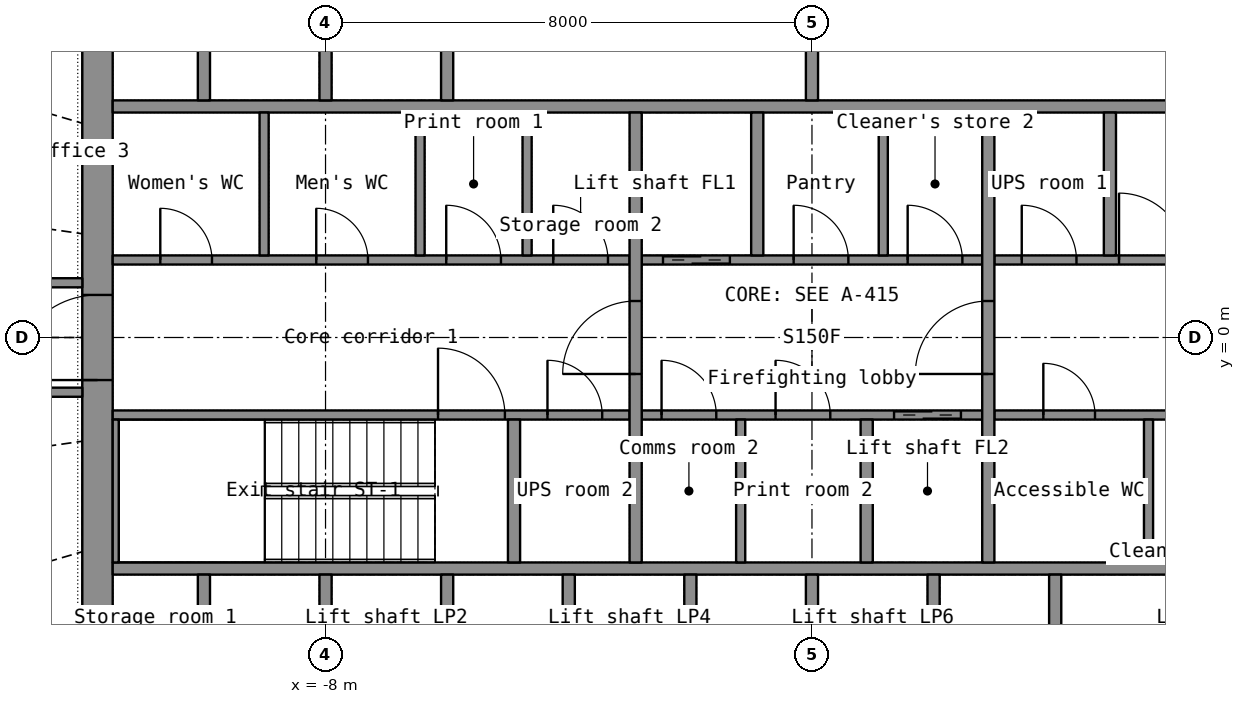
"""IFC4 building model, lengths in metres.
Left out: names, types, materials, properties, quantities, classifications, styles, units other than length and angle.
Written with IfcOpenShell. Run it as: python <this file> out.ifc"""

import sys

from ifc_helpers import new_model, si_unit, direction, frame, frame_2d, origin, place, context, subcontext, project, spatial, rectangle, extrude, element, fill, save


model = new_model("IFC4")
c1 = context("Model", 3, precision=1e-05, world=origin(), true_north=direction((0.0, 1.0)))
c2 = subcontext(c1, "Body", "Model", "MODEL_VIEW")
j1 = project(units=[si_unit("LENGTHUNIT", "METRE"), si_unit("PLANEANGLEUNIT", "RADIAN")], contexts=[c1])
p1 = place(None, origin())
s1 = spatial("IfcSite", under=j1, at=p1, CompositionType="ELEMENT")
p2 = place(p1, origin())
s2 = spatial("IfcBuilding", under=s1, at=p2, CompositionType="ELEMENT")
p3 = place(p2, frame((0.0, 0.0, 100.8)))
s3 = spatial("IfcBuildingStorey", under=s2, at=p3, CompositionType="ELEMENT", Elevation=100.8)
p4 = place(p3, frame((-11.75, -7.2, 0.0), z_axis=(0.0, 0.0, 1.0), x_axis=(0.0, 1.0, 0.0)))
e1 = element("IfcWall", 1, at=p4, inside=s3, PredefinedType="SHEAR", context=c2, shape_type="SweptSolid", body=[
    extrude(rectangle(XDim=14.4, YDim=0.5, at=frame_2d((7.2, 0.0))), origin(), (0.0, 0.0, 1.0), 3.3),
])
p5 = place(p4, frame((6.5, 0.0, 0.0)))
e2 = element("IfcOpeningElement", 2, at=p5, cuts=e1, PredefinedType="OPENING", context=c2, shape_type="SweptSolid", body=[
    extrude(rectangle(XDim=1.4, YDim=2.2, at=frame_2d((0.7, 1.1))), frame((0.0, 0.26, 0.0), z_axis=(0.0, -1.0, 0.0), x_axis=(1.0, 0.0, 0.0)), (0.0, 0.0, 1.0), 0.52),
])
for number, where, z_axis, x_axis in (
    (3, (-11.5, -3.8, 0.0), (0.0, 0.0, 1.0), (1.0, 0.0, 0.0)),
    (4, (-11.5, 3.8, 0.0), (0.0, 0.0, 1.0), (1.0, 0.0, 0.0)),
):
    element("IfcWall", number, at=place(p3, frame(where, z_axis=z_axis, x_axis=x_axis)), inside=s3, PredefinedType="SHEAR", context=c2, shape_type="SweptSolid", body=[
        extrude(rectangle(XDim=23.0, YDim=0.2, at=frame_2d((11.5, 0.0))), origin(), (0.0, 0.0, 1.0), 3.3),
    ])
for number, where, z_axis, x_axis in (
    (5, (-10.0, -6.7, 0.0), (0.0, 0.0, 1.0), (0.0, 1.0, 0.0)),
    (6, (-8.0, -6.7, 0.0), (0.0, 0.0, 1.0), (0.0, 1.0, 0.0)),
    (7, (-6.0, -6.7, 0.0), (0.0, 0.0, 1.0), (0.0, 1.0, 0.0)),
    (8, (-4.0, -6.7, 0.0), (0.0, 0.0, 1.0), (0.0, 1.0, 0.0)),
    (9, (-2.0, -6.7, 0.0), (0.0, 0.0, 1.0), (0.0, 1.0, 0.0)),
    (10, (0.0, -6.7, 0.0), (0.0, 0.0, 1.0), (0.0, 1.0, 0.0)),
    (11, (2.0, -6.7, 0.0), (0.0, 0.0, 1.0), (0.0, 1.0, 0.0)),
    (12, (4.0, -6.7, 0.0), (0.0, 0.0, 1.0), (0.0, 1.0, 0.0)),
    (13, (-10.0, 3.9, 0.0), (0.0, 0.0, 1.0), (0.0, 1.0, 0.0)),
    (14, (-8.0, 3.9, 0.0), (0.0, 0.0, 1.0), (0.0, 1.0, 0.0)),
    (15, (-6.0, 3.9, 0.0), (0.0, 0.0, 1.0), (0.0, 1.0, 0.0)),
):
    element("IfcWall", number, at=place(p3, frame(where, z_axis=z_axis, x_axis=x_axis)), inside=s3, PredefinedType="SHEAR", context=c2, shape_type="SweptSolid", body=[
        extrude(rectangle(XDim=2.8, YDim=0.2, at=frame_2d((1.4, 0.0))), origin(), (0.0, 0.0, 1.0), 3.3),
    ])
p6 = place(p3, frame((0.0, 3.9, 0.0), z_axis=(0.0, 0.0, 1.0), x_axis=(0.0, 1.0, 0.0)))
e16 = element("IfcWall", 16, at=p6, inside=s3, PredefinedType="PARTITIONING", context=c2, shape_type="SweptSolid", body=[
    extrude(rectangle(XDim=2.8, YDim=0.2, at=frame_2d((1.4, 0.0))), origin(), (0.0, 0.0, 1.0), 3.3),
])
p7 = place(p3, frame((-11.5, -1.275, 0.0), z_axis=(0.0, 0.0, 1.0), x_axis=(1.0, 0.0, 0.0)))
e17 = element("IfcWall", 17, at=p7, inside=s3, PredefinedType="SHEAR", context=c2, shape_type="SweptSolid", body=[
    extrude(rectangle(XDim=8.5, YDim=0.15, at=frame_2d((4.25, 0.0))), origin(), (0.0, 0.0, 1.0), 3.3),
])
p8 = place(p7, frame((5.35, 0.0, 0.0)))
e18 = element("IfcOpeningElement", 18, at=p8, cuts=e17, PredefinedType="OPENING", context=c2, shape_type="SweptSolid", body=[
    extrude(rectangle(XDim=1.1, YDim=2.15, at=frame_2d((0.55, 1.075))), frame((0.0, 0.085, 0.0), z_axis=(0.0, -1.0, 0.0), x_axis=(1.0, 0.0, 0.0)), (0.0, 0.0, 1.0), 0.17),
])
p9 = place(p7, frame((7.15, 0.0, 0.0)))
e19 = element("IfcOpeningElement", 19, at=p9, cuts=e17, PredefinedType="OPENING", context=c2, shape_type="SweptSolid", body=[
    extrude(rectangle(XDim=0.9, YDim=2.1, at=frame_2d((0.45, 1.05))), frame((0.0, 0.085, 0.0), z_axis=(0.0, -1.0, 0.0), x_axis=(1.0, 0.0, 0.0)), (0.0, 0.0, 1.0), 0.17),
])
p10 = place(p3, frame((-2.8, -1.275, 0.0), z_axis=(0.0, 0.0, 1.0), x_axis=(1.0, 0.0, 0.0)))
e20 = element("IfcWall", 20, at=p10, inside=s3, PredefinedType="SHEAR", context=c2, shape_type="SweptSolid", body=[
    extrude(rectangle(XDim=5.6, YDim=0.15, at=frame_2d((2.8, 0.0))), origin(), (0.0, 0.0, 1.0), 3.3),
])
p11 = place(p10, frame((4.15, 0.0, 0.0)))
e21 = element("IfcOpeningElement", 21, at=p11, cuts=e20, PredefinedType="OPENING", context=c2, shape_type="SweptSolid", body=[
    extrude(rectangle(XDim=1.1, YDim=2.2, at=frame_2d((0.55, 1.1))), frame((0.0, 0.085, 0.0), z_axis=(0.0, -1.0, 0.0), x_axis=(1.0, 0.0, 0.0)), (0.0, 0.0, 1.0), 0.17),
])
p12 = place(p10, frame((0.326, 0.0, 0.0)))
e22 = element("IfcOpeningElement", 22, at=p12, cuts=e20, PredefinedType="OPENING", context=c2, shape_type="SweptSolid", body=[
    extrude(rectangle(XDim=0.9, YDim=2.1, at=frame_2d((0.45, 1.05))), frame((0.0, 0.085, 0.0), z_axis=(0.0, -1.0, 0.0), x_axis=(1.0, 0.0, 0.0)), (0.0, 0.0, 1.0), 0.17),
])
p13 = place(p10, frame((2.201, 0.0, 0.0)))
e23 = element("IfcOpeningElement", 23, at=p13, cuts=e20, PredefinedType="OPENING", context=c2, shape_type="SweptSolid", body=[
    extrude(rectangle(XDim=0.9, YDim=2.1, at=frame_2d((0.45, 1.05))), frame((0.0, 0.085, 0.0), z_axis=(0.0, -1.0, 0.0), x_axis=(1.0, 0.0, 0.0)), (0.0, 0.0, 1.0), 0.17),
])
p14 = place(p3, frame((3.0, -1.275, 0.0), z_axis=(0.0, 0.0, 1.0), x_axis=(1.0, 0.0, 0.0)))
e24 = element("IfcWall", 24, at=p14, inside=s3, PredefinedType="PARTITIONING", context=c2, shape_type="SweptSolid", body=[
    extrude(rectangle(XDim=8.5, YDim=0.15, at=frame_2d((4.25, 0.0))), origin(), (0.0, 0.0, 1.0), 3.3),
])
p15 = place(p14, frame((0.805, 0.0, 0.0)))
e25 = element("IfcOpeningElement", 25, at=p15, cuts=e24, PredefinedType="OPENING", context=c2, shape_type="SweptSolid", body=[
    extrude(rectangle(XDim=0.85, YDim=2.1, at=frame_2d((0.425, 1.05))), frame((0.0, 0.085, 0.0), z_axis=(0.0, -1.0, 0.0), x_axis=(1.0, 0.0, 0.0)), (0.0, 0.0, 1.0), 0.17),
])
p16 = place(p14, frame((3.062, 0.0, 0.0)))
e26 = element("IfcOpeningElement", 26, at=p16, cuts=e24, PredefinedType="OPENING", context=c2, shape_type="SweptSolid", body=[
    extrude(rectangle(XDim=0.9, YDim=2.1, at=frame_2d((0.45, 1.05))), frame((0.0, 0.085, 0.0), z_axis=(0.0, -1.0, 0.0), x_axis=(1.0, 0.0, 0.0)), (0.0, 0.0, 1.0), 0.17),
])
p17 = place(p14, frame((6.082, 0.0, 0.0)))
e27 = element("IfcOpeningElement", 27, at=p17, cuts=e24, PredefinedType="OPENING", context=c2, shape_type="SweptSolid", body=[
    extrude(rectangle(XDim=0.9, YDim=2.1, at=frame_2d((0.45, 1.05))), frame((0.0, 0.085, 0.0), z_axis=(0.0, -1.0, 0.0), x_axis=(1.0, 0.0, 0.0)), (0.0, 0.0, 1.0), 0.17),
])
p18 = place(p3, frame((-11.5, 1.275, 0.0), z_axis=(0.0, 0.0, 1.0), x_axis=(1.0, 0.0, 0.0)))
e28 = element("IfcWall", 28, at=p18, inside=s3, PredefinedType="PARTITIONING", context=c2, shape_type="SweptSolid", body=[
    extrude(rectangle(XDim=8.5, YDim=0.15, at=frame_2d((4.25, 0.0))), origin(), (0.0, 0.0, 1.0), 3.3),
])
p19 = place(p18, frame((0.782, 0.0, 0.0)))
e29 = element("IfcOpeningElement", 29, at=p19, cuts=e28, PredefinedType="OPENING", context=c2, shape_type="SweptSolid", body=[
    extrude(rectangle(XDim=0.85, YDim=2.1, at=frame_2d((0.425, 1.05))), frame((0.0, 0.085, 0.0), z_axis=(0.0, -1.0, 0.0), x_axis=(1.0, 0.0, 0.0)), (0.0, 0.0, 1.0), 0.17),
])
p20 = place(p18, frame((3.347, 0.0, 0.0)))
e30 = element("IfcOpeningElement", 30, at=p20, cuts=e28, PredefinedType="OPENING", context=c2, shape_type="SweptSolid", body=[
    extrude(rectangle(XDim=0.85, YDim=2.1, at=frame_2d((0.425, 1.05))), frame((0.0, 0.085, 0.0), z_axis=(0.0, -1.0, 0.0), x_axis=(1.0, 0.0, 0.0)), (0.0, 0.0, 1.0), 0.17),
])
p21 = place(p18, frame((5.485, 0.0, 0.0)))
e31 = element("IfcOpeningElement", 31, at=p21, cuts=e28, PredefinedType="OPENING", context=c2, shape_type="SweptSolid", body=[
    extrude(rectangle(XDim=0.9, YDim=2.1, at=frame_2d((0.45, 1.05))), frame((0.0, 0.085, 0.0), z_axis=(0.0, -1.0, 0.0), x_axis=(1.0, 0.0, 0.0)), (0.0, 0.0, 1.0), 0.17),
])
p22 = place(p18, frame((7.245, 0.0, 0.0)))
e32 = element("IfcOpeningElement", 32, at=p22, cuts=e28, PredefinedType="OPENING", context=c2, shape_type="SweptSolid", body=[
    extrude(rectangle(XDim=0.9, YDim=2.1, at=frame_2d((0.45, 1.05))), frame((0.0, 0.085, 0.0), z_axis=(0.0, -1.0, 0.0), x_axis=(1.0, 0.0, 0.0)), (0.0, 0.0, 1.0), 0.17),
])
p23 = place(p3, frame((-2.8, 1.275, 0.0), z_axis=(0.0, 0.0, 1.0), x_axis=(1.0, 0.0, 0.0)))
e33 = element("IfcWall", 33, at=p23, inside=s3, PredefinedType="SHEAR", context=c2, shape_type="SweptSolid", body=[
    extrude(rectangle(XDim=5.6, YDim=0.15, at=frame_2d((2.8, 0.0))), origin(), (0.0, 0.0, 1.0), 3.3),
])
p24 = place(p23, frame((0.35, 0.0, 0.0)))
e34 = element("IfcOpeningElement", 34, at=p24, cuts=e33, PredefinedType="OPENING", context=c2, shape_type="SweptSolid", body=[
    extrude(rectangle(XDim=1.1, YDim=2.2, at=frame_2d((0.55, 1.1))), frame((0.0, 0.085, 0.0), z_axis=(0.0, -1.0, 0.0), x_axis=(1.0, 0.0, 0.0)), (0.0, 0.0, 1.0), 0.17),
])
p25 = place(p23, frame((2.499, 0.0, 0.0)))
e35 = element("IfcOpeningElement", 35, at=p25, cuts=e33, PredefinedType="OPENING", context=c2, shape_type="SweptSolid", body=[
    extrude(rectangle(XDim=0.9, YDim=2.1, at=frame_2d((0.45, 1.05))), frame((0.0, 0.085, 0.0), z_axis=(0.0, -1.0, 0.0), x_axis=(1.0, 0.0, 0.0)), (0.0, 0.0, 1.0), 0.17),
])
p26 = place(p23, frame((4.374, 0.0, 0.0)))
e36 = element("IfcOpeningElement", 36, at=p26, cuts=e33, PredefinedType="OPENING", context=c2, shape_type="SweptSolid", body=[
    extrude(rectangle(XDim=0.9, YDim=2.1, at=frame_2d((0.45, 1.05))), frame((0.0, 0.085, 0.0), z_axis=(0.0, -1.0, 0.0), x_axis=(1.0, 0.0, 0.0)), (0.0, 0.0, 1.0), 0.17),
])
p27 = place(p3, frame((3.0, 1.275, 0.0), z_axis=(0.0, 0.0, 1.0), x_axis=(1.0, 0.0, 0.0)))
e37 = element("IfcWall", 37, at=p27, inside=s3, PredefinedType="SHEAR", context=c2, shape_type="SweptSolid", body=[
    extrude(rectangle(XDim=8.5, YDim=0.15, at=frame_2d((4.25, 0.0))), origin(), (0.0, 0.0, 1.0), 3.3),
])
p28 = place(p27, frame((2.05, 0.0, 0.0)))
e38 = element("IfcOpeningElement", 38, at=p28, cuts=e37, PredefinedType="OPENING", context=c2, shape_type="SweptSolid", body=[
    extrude(rectangle(XDim=1.1, YDim=2.15, at=frame_2d((0.55, 1.075))), frame((0.0, 0.085, 0.0), z_axis=(0.0, -1.0, 0.0), x_axis=(1.0, 0.0, 0.0)), (0.0, 0.0, 1.0), 0.17),
])
p29 = place(p27, frame((0.45, 0.0, 0.0)))
e39 = element("IfcOpeningElement", 39, at=p29, cuts=e37, PredefinedType="OPENING", context=c2, shape_type="SweptSolid", body=[
    extrude(rectangle(XDim=0.9, YDim=2.1, at=frame_2d((0.45, 1.05))), frame((0.0, 0.085, 0.0), z_axis=(0.0, -1.0, 0.0), x_axis=(1.0, 0.0, 0.0)), (0.0, 0.0, 1.0), 0.17),
])
p30 = place(p3, frame((-2.9, -3.7, 0.0), z_axis=(0.0, 0.0, 1.0), x_axis=(0.0, 1.0, 0.0)))
e40 = element("IfcWall", 40, at=p30, inside=s3, PredefinedType="SHEAR", context=c2, shape_type="SweptSolid", body=[
    extrude(rectangle(XDim=7.4, YDim=0.2, at=frame_2d((3.7, 0.0))), origin(), (0.0, 0.0, 1.0), 3.3),
])
p31 = place(p30, frame((3.1, 0.0, 0.0)))
e41 = element("IfcOpeningElement", 41, at=p31, cuts=e40, PredefinedType="OPENING", context=c2, shape_type="SweptSolid", body=[
    extrude(rectangle(XDim=1.2, YDim=2.2, at=frame_2d((0.6, 1.1))), frame((0.0, 0.11, 0.0), z_axis=(0.0, -1.0, 0.0), x_axis=(1.0, 0.0, 0.0)), (0.0, 0.0, 1.0), 0.22),
])
p32 = place(p3, frame((2.9, -3.7, 0.0), z_axis=(0.0, 0.0, 1.0), x_axis=(0.0, 1.0, 0.0)))
e42 = element("IfcWall", 42, at=p32, inside=s3, PredefinedType="SHEAR", context=c2, shape_type="SweptSolid", body=[
    extrude(rectangle(XDim=7.4, YDim=0.2, at=frame_2d((3.7, 0.0))), origin(), (0.0, 0.0, 1.0), 3.3),
])
p33 = place(p32, frame((3.1, 0.0, 0.0)))
e43 = element("IfcOpeningElement", 43, at=p33, cuts=e42, PredefinedType="OPENING", context=c2, shape_type="SweptSolid", body=[
    extrude(rectangle(XDim=1.2, YDim=2.2, at=frame_2d((0.6, 1.1))), frame((0.0, 0.11, 0.0), z_axis=(0.0, -1.0, 0.0), x_axis=(1.0, 0.0, 0.0)), (0.0, 0.0, 1.0), 0.22),
])
for number, where, z_axis, x_axis in (
    (44, (-0.9, 1.35, 0.0), (0.0, 0.0, 1.0), (0.0, 1.0, 0.0)),
    (45, (0.9, -3.7, 0.0), (0.0, 0.0, 1.0), (0.0, 1.0, 0.0)),
):
    element("IfcWall", number, at=place(p3, frame(where, z_axis=z_axis, x_axis=x_axis)), inside=s3, PredefinedType="SHEAR", context=c2, shape_type="SweptSolid", body=[
        extrude(rectangle(XDim=2.35, YDim=0.2, at=frame_2d((1.175, 0.0))), origin(), (0.0, 0.0, 1.0), 3.3),
    ])
p34 = place(p3, frame((-11.45, -3.7, 0.0), z_axis=(0.0, 0.0, 1.0), x_axis=(0.0, 1.0, 0.0)))
e46 = element("IfcWall", 46, at=p34, inside=s3, PredefinedType="SHEAR", context=c2, shape_type="SweptSolid", body=[
    extrude(rectangle(XDim=2.35, YDim=0.1, at=frame_2d((1.175, 0.0))), origin(), (0.0, 0.0, 1.0), 3.3),
])
for number, where, z_axis, x_axis in (
    (47, (-4.9, -3.7, 0.0), (0.0, 0.0, 1.0), (0.0, 1.0, 0.0)),
    (48, (4.9, 1.35, 0.0), (0.0, 0.0, 1.0), (0.0, 1.0, 0.0)),
):
    element("IfcWall", number, at=place(p3, frame(where, z_axis=z_axis, x_axis=x_axis)), inside=s3, PredefinedType="SHEAR", context=c2, shape_type="SweptSolid", body=[
        extrude(rectangle(XDim=2.35, YDim=0.2, at=frame_2d((1.175, 0.0))), origin(), (0.0, 0.0, 1.0), 3.3),
    ])
for number, where, z_axis, x_axis in (
    (49, (-9.01, 1.35, 0.0), (0.0, 0.0, 1.0), (0.0, 1.0, 0.0)),
    (50, (-6.445, 1.35, 0.0), (0.0, 0.0, 1.0), (0.0, 1.0, 0.0)),
    (51, (-4.685, 1.35, 0.0), (0.0, 0.0, 1.0), (0.0, 1.0, 0.0)),
    (52, (5.535, -3.7, 0.0), (0.0, 0.0, 1.0), (0.0, 1.0, 0.0)),
    (53, (1.173, 1.35, 0.0), (0.0, 0.0, 1.0), (0.0, 1.0, 0.0)),
    (54, (-1.173, -3.7, 0.0), (0.0, 0.0, 1.0), (0.0, 1.0, 0.0)),
):
    element("IfcWall", number, at=place(p3, frame(where, z_axis=z_axis, x_axis=x_axis)), inside=s3, PredefinedType="PARTITIONING", context=c2, shape_type="SweptSolid", body=[
        extrude(rectangle(XDim=2.35, YDim=0.15, at=frame_2d((1.175, 0.0))), origin(), (0.0, 0.0, 1.0), 3.3),
    ])
p35 = place(p3, frame((-12.0, 0.9, 0.0), z_axis=(0.0, 0.0, 1.0), x_axis=(-1.0, 0.0, 0.0)))
e55 = element("IfcWall", 55, at=p35, inside=s3, PredefinedType="PARTITIONING", context=c2, shape_type="SweptSolid", body=[
    extrude(rectangle(XDim=3.923, YDim=0.15, at=frame_2d((1.961, 0.0))), origin(), (0.0, 0.0, 1.0), 2.4),
])
p36 = place(p3, frame((-12.559, -0.9, 0.0), z_axis=(0.0, 0.0, 1.0), x_axis=(1.0, 0.0, 0.0)))
e56 = element("IfcWall", 56, at=p36, inside=s3, PredefinedType="PARTITIONING", context=c2, shape_type="SweptSolid", body=[
    extrude(rectangle(XDim=0.559, YDim=0.15, at=frame_2d((0.279, 0.0))), origin(), (0.0, 0.0, 1.0), 2.4),
])
p37 = place(p5, origin())
e57 = element("IfcDoor", 57, at=p37, inside=s3, OperationType="DOUBLE_DOOR_SINGLE_SWING", PredefinedType="DOOR", context=c2, shape_type="SweptSolid", body=[
    extrude(rectangle(XDim=1.4, YDim=2.2, at=frame_2d((0.7, 1.1))), frame((0.0, 0.025, 0.0), z_axis=(0.0, -1.0, 0.0), x_axis=(1.0, 0.0, 0.0)), (0.0, 0.0, 1.0), 0.05),
])
fill(e2, e57)
p38 = place(p31, origin())
e58 = element("IfcDoor", 58, at=p38, inside=s3, OperationType="SINGLE_SWING_LEFT", PredefinedType="DOOR", context=c2, shape_type="SweptSolid", body=[
    extrude(rectangle(XDim=1.2, YDim=2.2, at=frame_2d((0.6, 1.1))), frame((0.0, 0.025, 0.0), z_axis=(0.0, -1.0, 0.0), x_axis=(1.0, 0.0, 0.0)), (0.0, 0.0, 1.0), 0.05),
])
fill(e41, e58)
p39 = place(p33, origin())
e59 = element("IfcDoor", 59, at=p39, inside=s3, OperationType="SINGLE_SWING_LEFT", PredefinedType="DOOR", context=c2, shape_type="SweptSolid", body=[
    extrude(rectangle(XDim=1.2, YDim=2.2, at=frame_2d((0.6, 1.1))), frame((0.0, 0.025, 0.0), z_axis=(0.0, -1.0, 0.0), x_axis=(1.0, 0.0, 0.0)), (0.0, 0.0, 1.0), 0.05),
])
fill(e43, e59)
p40 = place(p24, origin())
e60 = element("IfcDoor", 60, at=p40, inside=s3, OperationType="DOUBLE_DOOR_SLIDING", PredefinedType="DOOR", context=c2, shape_type="SweptSolid", body=[
    extrude(rectangle(XDim=1.1, YDim=2.2, at=frame_2d((0.55, 1.1))), frame((0.0, 0.025, 0.0), z_axis=(0.0, -1.0, 0.0), x_axis=(1.0, 0.0, 0.0)), (0.0, 0.0, 1.0), 0.05),
])
fill(e34, e60)
p41 = place(p11, origin())
e61 = element("IfcDoor", 61, at=p41, inside=s3, OperationType="DOUBLE_DOOR_SLIDING", PredefinedType="DOOR", context=c2, shape_type="SweptSolid", body=[
    extrude(rectangle(XDim=1.1, YDim=2.2, at=frame_2d((0.55, 1.1))), frame((0.0, 0.025, 0.0), z_axis=(0.0, -1.0, 0.0), x_axis=(1.0, 0.0, 0.0)), (0.0, 0.0, 1.0), 0.05),
])
fill(e21, e61)
p42 = place(p8, origin())
e62 = element("IfcDoor", 62, at=p42, inside=s3, OperationType="SINGLE_SWING_LEFT", PredefinedType="DOOR", context=c2, shape_type="SweptSolid", body=[
    extrude(rectangle(XDim=1.1, YDim=2.15, at=frame_2d((0.55, 1.075))), frame((0.0, 0.025, 0.0), z_axis=(0.0, -1.0, 0.0), x_axis=(1.0, 0.0, 0.0)), (0.0, 0.0, 1.0), 0.05),
])
fill(e18, e62)
p43 = place(p28, origin())
e63 = element("IfcDoor", 63, at=p43, inside=s3, OperationType="SINGLE_SWING_LEFT", PredefinedType="DOOR", context=c2, shape_type="SweptSolid", body=[
    extrude(rectangle(XDim=1.1, YDim=2.15, at=frame_2d((0.55, 1.075))), frame((0.0, 0.025, 0.0), z_axis=(0.0, -1.0, 0.0), x_axis=(1.0, 0.0, 0.0)), (0.0, 0.0, 1.0), 0.05),
])
fill(e38, e63)
p44 = place(p19, origin())
e64 = element("IfcDoor", 64, at=p44, inside=s3, OperationType="SINGLE_SWING_LEFT", PredefinedType="DOOR", context=c2, shape_type="SweptSolid", body=[
    extrude(rectangle(XDim=0.85, YDim=2.1, at=frame_2d((0.425, 1.05))), frame((0.0, 0.025, 0.0), z_axis=(0.0, -1.0, 0.0), x_axis=(1.0, 0.0, 0.0)), (0.0, 0.0, 1.0), 0.05),
])
fill(e29, e64)
p45 = place(p20, origin())
e65 = element("IfcDoor", 65, at=p45, inside=s3, OperationType="SINGLE_SWING_LEFT", PredefinedType="DOOR", context=c2, shape_type="SweptSolid", body=[
    extrude(rectangle(XDim=0.85, YDim=2.1, at=frame_2d((0.425, 1.05))), frame((0.0, 0.025, 0.0), z_axis=(0.0, -1.0, 0.0), x_axis=(1.0, 0.0, 0.0)), (0.0, 0.0, 1.0), 0.05),
])
fill(e30, e65)
p46 = place(p21, origin())
e66 = element("IfcDoor", 66, at=p46, inside=s3, OperationType="SINGLE_SWING_LEFT", PredefinedType="DOOR", context=c2, shape_type="SweptSolid", body=[
    extrude(rectangle(XDim=0.9, YDim=2.1, at=frame_2d((0.45, 1.05))), frame((0.0, 0.025, 0.0), z_axis=(0.0, -1.0, 0.0), x_axis=(1.0, 0.0, 0.0)), (0.0, 0.0, 1.0), 0.05),
])
fill(e31, e66)
p47 = place(p22, origin())
e67 = element("IfcDoor", 67, at=p47, inside=s3, OperationType="SINGLE_SWING_LEFT", PredefinedType="DOOR", context=c2, shape_type="SweptSolid", body=[
    extrude(rectangle(XDim=0.9, YDim=2.1, at=frame_2d((0.45, 1.05))), frame((0.0, 0.025, 0.0), z_axis=(0.0, -1.0, 0.0), x_axis=(1.0, 0.0, 0.0)), (0.0, 0.0, 1.0), 0.05),
])
fill(e32, e67)
p48 = place(p15, origin())
e68 = element("IfcDoor", 68, at=p48, inside=s3, OperationType="SINGLE_SWING_LEFT", PredefinedType="DOOR", context=c2, shape_type="SweptSolid", body=[
    extrude(rectangle(XDim=0.85, YDim=2.1, at=frame_2d((0.425, 1.05))), frame((0.0, 0.025, 0.0), z_axis=(0.0, -1.0, 0.0), x_axis=(1.0, 0.0, 0.0)), (0.0, 0.0, 1.0), 0.05),
])
fill(e25, e68)
p49 = place(p25, origin())
e69 = element("IfcDoor", 69, at=p49, inside=s3, OperationType="SINGLE_SWING_LEFT", PredefinedType="DOOR", context=c2, shape_type="SweptSolid", body=[
    extrude(rectangle(XDim=0.9, YDim=2.1, at=frame_2d((0.45, 1.05))), frame((0.0, 0.025, 0.0), z_axis=(0.0, -1.0, 0.0), x_axis=(1.0, 0.0, 0.0)), (0.0, 0.0, 1.0), 0.05),
])
fill(e35, e69)
p50 = place(p26, origin())
e70 = element("IfcDoor", 70, at=p50, inside=s3, OperationType="SINGLE_SWING_LEFT", PredefinedType="DOOR", context=c2, shape_type="SweptSolid", body=[
    extrude(rectangle(XDim=0.9, YDim=2.1, at=frame_2d((0.45, 1.05))), frame((0.0, 0.025, 0.0), z_axis=(0.0, -1.0, 0.0), x_axis=(1.0, 0.0, 0.0)), (0.0, 0.0, 1.0), 0.05),
])
fill(e36, e70)
p51 = place(p12, origin())
e71 = element("IfcDoor", 71, at=p51, inside=s3, OperationType="SINGLE_SWING_LEFT", PredefinedType="DOOR", context=c2, shape_type="SweptSolid", body=[
    extrude(rectangle(XDim=0.9, YDim=2.1, at=frame_2d((0.45, 1.05))), frame((0.0, 0.025, 0.0), z_axis=(0.0, -1.0, 0.0), x_axis=(1.0, 0.0, 0.0)), (0.0, 0.0, 1.0), 0.05),
])
fill(e22, e71)
p52 = place(p13, origin())
e72 = element("IfcDoor", 72, at=p52, inside=s3, OperationType="SINGLE_SWING_LEFT", PredefinedType="DOOR", context=c2, shape_type="SweptSolid", body=[
    extrude(rectangle(XDim=0.9, YDim=2.1, at=frame_2d((0.45, 1.05))), frame((0.0, 0.025, 0.0), z_axis=(0.0, -1.0, 0.0), x_axis=(1.0, 0.0, 0.0)), (0.0, 0.0, 1.0), 0.05),
])
fill(e23, e72)
p53 = place(p29, origin())
e73 = element("IfcDoor", 73, at=p53, inside=s3, OperationType="SINGLE_SWING_LEFT", PredefinedType="DOOR", context=c2, shape_type="SweptSolid", body=[
    extrude(rectangle(XDim=0.9, YDim=2.1, at=frame_2d((0.45, 1.05))), frame((0.0, 0.025, 0.0), z_axis=(0.0, -1.0, 0.0), x_axis=(1.0, 0.0, 0.0)), (0.0, 0.0, 1.0), 0.05),
])
fill(e39, e73)
p54 = place(p9, origin())
e74 = element("IfcDoor", 74, at=p54, inside=s3, OperationType="SINGLE_SWING_LEFT", PredefinedType="DOOR", context=c2, shape_type="SweptSolid", body=[
    extrude(rectangle(XDim=0.9, YDim=2.1, at=frame_2d((0.45, 1.05))), frame((0.0, 0.025, 0.0), z_axis=(0.0, -1.0, 0.0), x_axis=(1.0, 0.0, 0.0)), (0.0, 0.0, 1.0), 0.05),
])
fill(e19, e74)
save(model, sys.argv[1])
